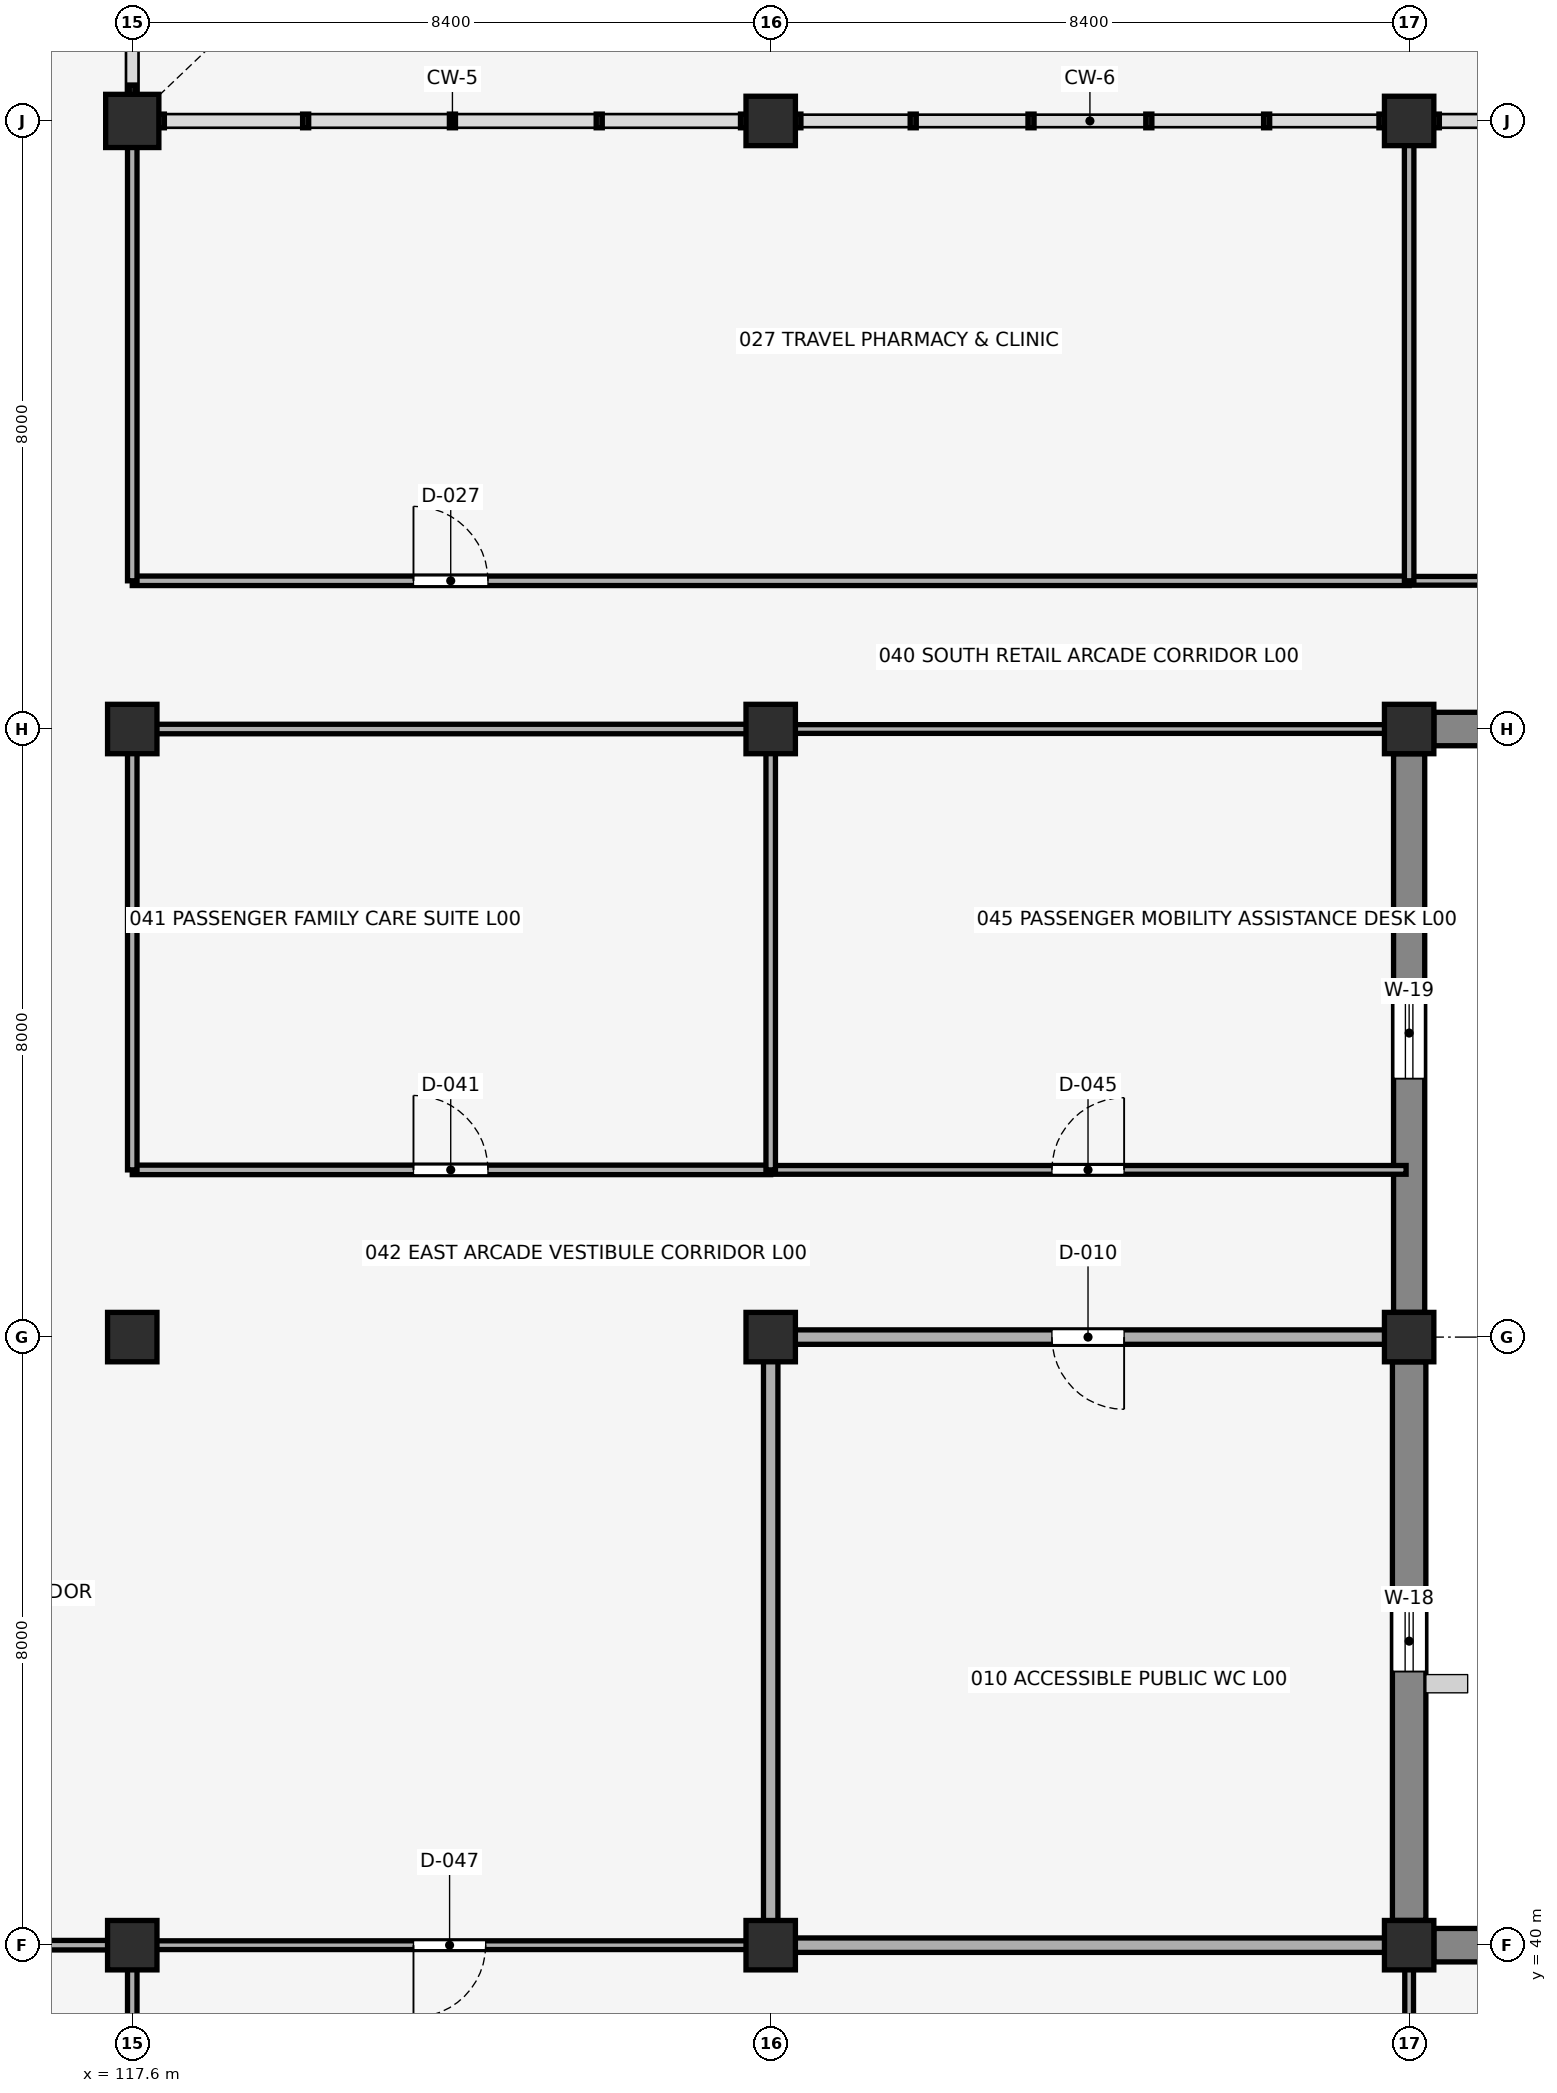
"""IFC4 building model, lengths in metres.
Left out: names, types, materials, properties, quantities, classifications, styles, units other than length and angle.
Written with IfcOpenShell. Run it as: python <this file> out.ifc"""

import sys

from ifc_helpers import new_model, si_unit, direction, frame, frame_2d, origin, origin_2d, place, context, subcontext, project, spatial, rectangle, circle, extrude, element, fill, save


model = new_model("IFC4")
c1 = context("Model", 3, precision=1e-05, world=origin(), true_north=direction((0.0, 1.0)))
c2 = subcontext(c1, "Body", "Model", "MODEL_VIEW")
j1 = project(units=[si_unit("LENGTHUNIT", "METRE"), si_unit("PLANEANGLEUNIT", "RADIAN")], contexts=[c1])
p1 = place(None, origin())
s1 = spatial("IfcSite", under=j1, at=p1, CompositionType="ELEMENT")
p2 = place(p1, origin())
s2 = spatial("IfcBuilding", under=s1, at=p2, CompositionType="ELEMENT")
p3 = place(p2, origin())
s3 = spatial("IfcBuildingStorey", under=s2, at=p3, CompositionType="ELEMENT", Elevation=0.0)
for number, where, z_axis, x_axis in (
    (1, (117.6, 40.0, 0.0), (0.0, 0.0, 1.0), (1.0, 0.0, 0.0)),
    (2, (117.6, 48.0, 0.0), (0.0, 0.0, 1.0), (1.0, 0.0, 0.0)),
    (3, (117.6, 56.0, 0.0), (0.0, 0.0, 1.0), (1.0, 0.0, 0.0)),
):
    element("IfcColumn", number, at=place(p3, frame(where, z_axis=z_axis, x_axis=x_axis)), inside=s3, PredefinedType="COLUMN", context=c2, shape_type="SweptSolid", body=[
        extrude(circle(Radius=0.325, at=origin_2d()), origin(), (0.0, 0.0, 1.0), 5.15),
    ])
p4 = place(p3, frame((117.6, 64.0, 0.0), z_axis=(0.0, 0.0, 1.0), x_axis=(1.0, 0.0, 0.0)))
e4 = element("IfcColumn", 4, at=p4, inside=s3, PredefinedType="COLUMN", context=c2, shape_type="SweptSolid", body=[
    extrude(rectangle(XDim=0.7, YDim=0.7, at=origin_2d()), origin(), (0.0, 0.0, 1.0), 5.15),
])
for number, where, z_axis, x_axis in (
    (5, (126.0, 40.0, 0.0), (0.0, 0.0, 1.0), (1.0, 0.0, 0.0)),
    (6, (126.0, 48.0, 0.0), (0.0, 0.0, 1.0), (1.0, 0.0, 0.0)),
    (7, (126.0, 56.0, 0.0), (0.0, 0.0, 1.0), (1.0, 0.0, 0.0)),
    (8, (126.0, 64.0, 0.0), (0.0, 0.0, 1.0), (1.0, 0.0, 0.0)),
    (9, (134.4, 40.0, 0.0), (0.0, 0.0, 1.0), (1.0, 0.0, 0.0)),
    (10, (134.4, 48.0, 0.0), (0.0, 0.0, 1.0), (1.0, 0.0, 0.0)),
    (11, (134.4, 56.0, 0.0), (0.0, 0.0, 1.0), (1.0, 0.0, 0.0)),
    (12, (134.4, 64.0, 0.0), (0.0, 0.0, 1.0), (1.0, 0.0, 0.0)),
):
    element("IfcColumn", number, at=place(p3, frame(where, z_axis=z_axis, x_axis=x_axis)), inside=s3, PredefinedType="COLUMN", context=c2, shape_type="SweptSolid", body=[
        extrude(circle(Radius=0.325, at=origin_2d()), origin(), (0.0, 0.0, 1.0), 5.15),
    ])
p5 = place(p3, frame((134.725, 56.0, 0.0), z_axis=(0.0, 0.0, 1.0), x_axis=(1.0, 0.0, 0.0)))
e13 = element("IfcWall", 13, at=p5, inside=s3, PredefinedType="SOLIDWALL", context=c2, shape_type="SweptSolid", body=[
    extrude(rectangle(XDim=7.75, YDim=0.44, at=frame_2d((3.875, 0.0))), origin(), (0.0, 0.0, 1.0), 4.74),
])
p6 = place(p5, frame((2.825, 0.0, 1.55), z_axis=(0.0, 0.0, 1.0), x_axis=(1.0, 0.0, 0.0)))
e14 = element("IfcOpeningElement", 14, at=p6, cuts=e13, PredefinedType="OPENING", context=c2, shape_type="SweptSolid", body=[
    extrude(rectangle(XDim=2.1, YDim=0.8, at=frame_2d((1.05, 0.4))), frame((0.0, 0.23, 0.0), z_axis=(0.0, -1.0, 0.0), x_axis=(1.0, 0.0, 0.0)), (0.0, 0.0, 1.0), 0.46),
])
p7 = place(p3, frame((134.4, 40.325, 0.0), z_axis=(0.0, 0.0, 1.0), x_axis=(0.0, 1.0, 0.0)))
e15 = element("IfcWall", 15, at=p7, inside=s3, PredefinedType="SOLIDWALL", context=c2, shape_type="SweptSolid", body=[
    extrude(rectangle(XDim=7.35, YDim=0.44, at=frame_2d((3.675, 0.0))), origin(), (0.0, 0.0, 1.0), 4.747),
])
p8 = place(p7, frame((3.275, 0.0, 0.65), z_axis=(0.0, 0.0, 1.0), x_axis=(1.0, 0.0, 0.0)))
e16 = element("IfcOpeningElement", 16, at=p8, cuts=e15, PredefinedType="OPENING", context=c2, shape_type="SweptSolid", body=[
    extrude(rectangle(XDim=0.8, YDim=1.85, at=frame_2d((0.4, 0.925))), frame((0.0, 0.23, 0.0), z_axis=(0.0, -1.0, 0.0), x_axis=(1.0, 0.0, 0.0)), (0.0, 0.0, 1.0), 0.46),
])
p9 = place(p3, frame((134.4, 48.325, 0.0), z_axis=(0.0, 0.0, 1.0), x_axis=(0.0, 1.0, 0.0)))
e17 = element("IfcWall", 17, at=p9, inside=s3, PredefinedType="SOLIDWALL", context=c2, shape_type="SweptSolid", body=[
    extrude(rectangle(XDim=7.35, YDim=0.41, at=frame_2d((3.675, 0.0))), origin(), (0.0, 0.0, 1.0), 4.747),
])
p10 = place(p9, frame((3.075, 0.0, 1.55), z_axis=(0.0, 0.0, 1.0), x_axis=(1.0, 0.0, 0.0)))
e18 = element("IfcOpeningElement", 18, at=p10, cuts=e17, PredefinedType="OPENING", context=c2, shape_type="SweptSolid", body=[
    extrude(rectangle(XDim=1.2, YDim=0.95, at=frame_2d((0.6, 0.475))), frame((0.0, 0.215, 0.0), z_axis=(0.0, -1.0, 0.0), x_axis=(1.0, 0.0, 0.0)), (0.0, 0.0, 1.0), 0.43),
])
p11 = place(p3, frame((134.725, 40.0, 0.0), z_axis=(0.0, 0.0, 1.0), x_axis=(1.0, 0.0, 0.0)))
e19 = element("IfcWall", 19, at=p11, inside=s3, PredefinedType="SOLIDWALL", context=c2, shape_type="SweptSolid", body=[
    extrude(rectangle(XDim=7.75, YDim=0.44, at=frame_2d((3.875, 0.0))), origin(), (0.0, 0.0, 1.0), 4.74),
])
p12 = place(p11, frame((3.075, 0.0, 0.9), z_axis=(0.0, 0.0, 1.0), x_axis=(1.0, 0.0, 0.0)))
e20 = element("IfcOpeningElement", 20, at=p12, cuts=e19, PredefinedType="OPENING", context=c2, shape_type="SweptSolid", body=[
    extrude(rectangle(XDim=1.6, YDim=1.2, at=frame_2d((0.8, 0.6))), frame((0.0, 0.23, 0.0), z_axis=(0.0, -1.0, 0.0), x_axis=(1.0, 0.0, 0.0)), (0.0, 0.0, 1.0), 0.46),
])
p13 = place(p3, frame((126.315, 48.0, 0.0), z_axis=(0.0, 0.0, 1.0), x_axis=(1.0, 0.0, 0.0)))
e21 = element("IfcWall", 21, at=p13, inside=s3, PredefinedType="PLUMBINGWALL", context=c2, shape_type="SweptSolid", body=[
    extrude(rectangle(XDim=7.77, YDim=0.19, at=frame_2d((3.885, 0.0))), origin(), (0.0, 0.0, 1.0), 4.605),
])
p14 = place(p13, frame((4.335, 0.0, 0.0), z_axis=(0.0, 0.0, 1.0), x_axis=(-1.0, 0.0, 0.0)))
e22 = element("IfcOpeningElement", 22, at=p14, cuts=e21, PredefinedType="OPENING", context=c2, shape_type="SweptSolid", body=[
    extrude(rectangle(XDim=0.95, YDim=2.15, at=frame_2d((0.475, 1.075))), frame((0.0, 0.105, 0.0), z_axis=(0.0, -1.0, 0.0), x_axis=(1.0, 0.0, 0.0)), (0.0, 0.0, 1.0), 0.21),
])
p15 = place(p3, frame((117.6, 50.2, 0.0), z_axis=(0.0, 0.0, 1.0), x_axis=(1.0, 0.0, 0.0)))
e23 = element("IfcWall", 23, at=p15, inside=s3, PredefinedType="PARTITIONING", context=c2, shape_type="SweptSolid", body=[
    extrude(rectangle(XDim=8.4, YDim=0.125, at=frame_2d((4.2, 0.0))), origin(), (0.0, 0.0, 1.0), 5.15),
])
p16 = place(p15, frame((3.7, 0.0, 0.0), z_axis=(0.0, 0.0, 1.0), x_axis=(1.0, 0.0, 0.0)))
e24 = element("IfcOpeningElement", 24, at=p16, cuts=e23, PredefinedType="OPENING", context=c2, shape_type="SweptSolid", body=[
    extrude(rectangle(XDim=0.98, YDim=2.15, at=frame_2d((0.49, 1.075))), frame((0.0, 0.073, 0.0), z_axis=(0.0, -1.0, 0.0), x_axis=(1.0, 0.0, 0.0)), (0.0, 0.0, 1.0), 0.145),
])
p17 = place(p3, frame((126.0, 50.2, 0.0), z_axis=(0.0, 0.0, 1.0), x_axis=(1.0, 0.0, 0.0)))
e25 = element("IfcWall", 25, at=p17, inside=s3, PredefinedType="PARTITIONING", context=c2, shape_type="SweptSolid", body=[
    extrude(rectangle(XDim=8.36, YDim=0.115, at=frame_2d((4.18, 0.0))), origin(), (0.0, 0.0, 1.0), 5.15),
])
p18 = place(p17, frame((3.7, 0.0, 0.0), z_axis=(0.0, 0.0, 1.0), x_axis=(1.0, 0.0, 0.0)))
e26 = element("IfcOpeningElement", 26, at=p18, cuts=e25, PredefinedType="OPENING", context=c2, shape_type="SweptSolid", body=[
    extrude(rectangle(XDim=0.95, YDim=2.15, at=frame_2d((0.475, 1.075))), frame((0.0, 0.067, 0.0), z_axis=(0.0, -1.0, 0.0), x_axis=(1.0, 0.0, 0.0)), (0.0, 0.0, 1.0), 0.135),
])
p19 = place(p3, frame((117.915, 40.0, 0.0), z_axis=(0.0, 0.0, 1.0), x_axis=(1.0, 0.0, 0.0)))
e27 = element("IfcWall", 27, at=p19, inside=s3, PredefinedType="PARTITIONING", context=c2, shape_type="SweptSolid", body=[
    extrude(rectangle(XDim=7.77, YDim=0.115, at=frame_2d((3.885, 0.0))), origin(), (0.0, 0.0, 1.0), 4.605),
])
p20 = place(p19, frame((4.335, 0.0, 0.0), z_axis=(0.0, 0.0, 1.0), x_axis=(-1.0, 0.0, 0.0)))
e28 = element("IfcOpeningElement", 28, at=p20, cuts=e27, PredefinedType="OPENING", context=c2, shape_type="SweptSolid", body=[
    extrude(rectangle(XDim=0.95, YDim=2.15, at=frame_2d((0.475, 1.075))), frame((0.0, 0.067, 0.0), z_axis=(0.0, -1.0, 0.0), x_axis=(1.0, 0.0, 0.0)), (0.0, 0.0, 1.0), 0.135),
])
p21 = place(p3, frame((117.6, 57.95, 0.0), z_axis=(0.0, 0.0, 1.0), x_axis=(1.0, 0.0, 0.0)))
e29 = element("IfcWall", 29, at=p21, inside=s3, PredefinedType="PARTITIONING", context=c2, shape_type="SweptSolid", body=[
    extrude(rectangle(XDim=16.8, YDim=0.125, at=frame_2d((8.4, 0.0))), origin(), (0.0, 0.0, 1.0), 5.15),
])
p22 = place(p21, frame((3.7, 0.0, 0.0), z_axis=(0.0, 0.0, 1.0), x_axis=(1.0, 0.0, 0.0)))
e30 = element("IfcOpeningElement", 30, at=p22, cuts=e29, PredefinedType="OPENING", context=c2, shape_type="SweptSolid", body=[
    extrude(rectangle(XDim=0.98, YDim=2.15, at=frame_2d((0.49, 1.075))), frame((0.0, 0.073, 0.0), z_axis=(0.0, -1.0, 0.0), x_axis=(1.0, 0.0, 0.0)), (0.0, 0.0, 1.0), 0.145),
])
p23 = place(p3, frame((134.4, 57.95, 0.0), z_axis=(0.0, 0.0, 1.0), x_axis=(1.0, 0.0, 0.0)))
e31 = element("IfcWall", 31, at=p23, inside=s3, PredefinedType="PARTITIONING", context=c2, shape_type="SweptSolid", body=[
    extrude(rectangle(XDim=16.8, YDim=0.115, at=frame_2d((8.4, 0.0))), origin(), (0.0, 0.0, 1.0), 4.542),
])
p24 = place(p23, frame((3.7, 0.0, 0.0), z_axis=(0.0, 0.0, 1.0), x_axis=(1.0, 0.0, 0.0)))
e32 = element("IfcOpeningElement", 32, at=p24, cuts=e31, PredefinedType="OPENING", context=c2, shape_type="SweptSolid", body=[
    extrude(rectangle(XDim=0.95, YDim=2.15, at=frame_2d((0.475, 1.075))), frame((0.0, 0.067, 0.0), z_axis=(0.0, -1.0, 0.0), x_axis=(1.0, 0.0, 0.0)), (0.0, 0.0, 1.0), 0.135),
])
p25 = place(p3, frame((126.315, 40.0, 0.0), z_axis=(0.0, 0.0, 1.0), x_axis=(1.0, 0.0, 0.0)))
e33 = element("IfcWall", 33, at=p25, inside=s3, PredefinedType="PLUMBINGWALL", context=c2, shape_type="SweptSolid", body=[
    extrude(rectangle(XDim=7.77, YDim=0.19, at=frame_2d((3.885, 0.0))), origin(), (0.0, 0.0, 1.0), 4.605),
])
p26 = place(p3, frame((126.0, 40.315, 0.0), z_axis=(0.0, 0.0, 1.0), x_axis=(0.0, 1.0, 0.0)))
e34 = element("IfcWall", 34, at=p26, inside=s3, PredefinedType="PLUMBINGWALL", context=c2, shape_type="SweptSolid", body=[
    extrude(rectangle(XDim=7.37, YDim=0.19, at=frame_2d((3.685, 0.0))), origin(), (0.0, 0.0, 1.0), 4.542),
])
p27 = place(p3, frame((117.915, 56.0, 0.0), z_axis=(0.0, 0.0, 1.0), x_axis=(1.0, 0.0, 0.0)))
e35 = element("IfcWall", 35, at=p27, inside=s3, PredefinedType="PARTITIONING", context=c2, shape_type="SweptSolid", body=[
    extrude(rectangle(XDim=7.77, YDim=0.125, at=frame_2d((3.885, 0.0))), origin(), (0.0, 0.0, 1.0), 4.605),
])
for number, where, z_axis, x_axis in (
    (36, (117.6, 50.2, 0.0), (0.0, 0.0, 1.0), (0.0, 1.0, 0.0)),
    (37, (126.0, 50.2, 0.0), (0.0, 0.0, 1.0), (0.0, 1.0, 0.0)),
):
    element("IfcWall", number, at=place(p3, frame(where, z_axis=z_axis, x_axis=x_axis)), inside=s3, PredefinedType="PARTITIONING", context=c2, shape_type="SweptSolid", body=[
        extrude(rectangle(XDim=5.485, YDim=0.125, at=frame_2d((2.743, 0.0))), origin(), (0.0, 0.0, 1.0), 4.542),
    ])
p28 = place(p3, frame((126.315, 56.0, 0.0), z_axis=(0.0, 0.0, 1.0), x_axis=(1.0, 0.0, 0.0)))
e38 = element("IfcWall", 38, at=p28, inside=s3, PredefinedType="PARTITIONING", context=c2, shape_type="SweptSolid", body=[
    extrude(rectangle(XDim=7.77, YDim=0.115, at=frame_2d((3.885, 0.0))), origin(), (0.0, 0.0, 1.0), 4.605),
])
p29 = place(p3, frame((109.515, 40.0, 0.0), z_axis=(0.0, 0.0, 1.0), x_axis=(1.0, 0.0, 0.0)))
e39 = element("IfcWall", 39, at=p29, inside=s3, PredefinedType="PARTITIONING", context=c2, shape_type="SweptSolid", body=[
    extrude(rectangle(XDim=7.77, YDim=0.125, at=frame_2d((3.885, 0.0))), origin(), (0.0, 0.0, 1.0), 4.605),
])
p30 = place(p3, frame((117.6, 32.187, 0.0), z_axis=(0.0, 0.0, 1.0), x_axis=(0.0, 1.0, 0.0)))
e40 = element("IfcWall", 40, at=p30, inside=s3, PredefinedType="PARTITIONING", context=c2, shape_type="SweptSolid", body=[
    extrude(rectangle(XDim=7.498, YDim=0.125, at=frame_2d((3.749, 0.0))), origin(), (0.0, 0.0, 1.0), 4.542),
])
p31 = place(p3, frame((134.4, 32.187, 0.0), z_axis=(0.0, 0.0, 1.0), x_axis=(0.0, 1.0, 0.0)))
e41 = element("IfcWall", 41, at=p31, inside=s3, PredefinedType="PARTITIONING", context=c2, shape_type="SweptSolid", body=[
    extrude(rectangle(XDim=7.498, YDim=0.115, at=frame_2d((3.749, 0.0))), origin(), (0.0, 0.0, 1.0), 4.542),
])
p32 = place(p3, frame((117.6, 57.95, 0.0), z_axis=(0.0, 0.0, 1.0), x_axis=(0.0, 1.0, 0.0)))
e42 = element("IfcWall", 42, at=p32, inside=s3, PredefinedType="PARTITIONING", context=c2, shape_type="SweptSolid", body=[
    extrude(rectangle(XDim=5.71, YDim=0.125, at=frame_2d((2.855, 0.0))), origin(), (0.0, 0.0, 1.0), 4.542),
])
p33 = place(p3, frame((134.4, 57.95, 0.0), z_axis=(0.0, 0.0, 1.0), x_axis=(0.0, 1.0, 0.0)))
e43 = element("IfcWall", 43, at=p33, inside=s3, PredefinedType="PARTITIONING", context=c2, shape_type="SweptSolid", body=[
    extrude(rectangle(XDim=5.735, YDim=0.125, at=frame_2d((2.868, 0.0))), origin(), (0.0, 0.0, 1.0), 4.542),
])
p34 = place(p8, origin())
e44 = element("IfcWindow", 44, at=p34, inside=s3, PartitioningType="SINGLE_PANEL", PredefinedType="WINDOW", context=c2, shape_type="SweptSolid", body=[
    extrude(rectangle(XDim=0.8, YDim=1.85, at=frame_2d((0.4, 0.925))), frame((0.0, 0.03, 0.0), z_axis=(0.0, -1.0, 0.0), x_axis=(1.0, 0.0, 0.0)), (0.0, 0.0, 1.0), 0.06),
])
fill(e16, e44)
p35 = place(p10, origin())
e45 = element("IfcWindow", 45, at=p35, inside=s3, PartitioningType="SINGLE_PANEL", PredefinedType="WINDOW", context=c2, shape_type="SweptSolid", body=[
    extrude(rectangle(XDim=1.2, YDim=0.95, at=frame_2d((0.6, 0.475))), frame((0.0, 0.03, 0.0), z_axis=(0.0, -1.0, 0.0), x_axis=(1.0, 0.0, 0.0)), (0.0, 0.0, 1.0), 0.06),
])
fill(e18, e45)
p36 = place(p14, origin())
e46 = element("IfcDoor", 46, at=p36, inside=s3, OperationType="SINGLE_SWING_LEFT", PredefinedType="DOOR", context=c2, shape_type="SweptSolid", body=[
    extrude(rectangle(XDim=0.95, YDim=2.15, at=frame_2d((0.475, 1.075))), frame((0.0, 0.025, 0.0), z_axis=(0.0, -1.0, 0.0), x_axis=(1.0, 0.0, 0.0)), (0.0, 0.0, 1.0), 0.05),
])
fill(e22, e46)
p37 = place(p16, origin())
e47 = element("IfcDoor", 47, at=p37, inside=s3, OperationType="SINGLE_SWING_LEFT", PredefinedType="DOOR", context=c2, shape_type="SweptSolid", body=[
    extrude(rectangle(XDim=0.98, YDim=2.15, at=frame_2d((0.49, 1.075))), frame((0.0, 0.025, 0.0), z_axis=(0.0, -1.0, 0.0), x_axis=(1.0, 0.0, 0.0)), (0.0, 0.0, 1.0), 0.05),
])
fill(e24, e47)
p38 = place(p18, origin())
e48 = element("IfcDoor", 48, at=p38, inside=s3, OperationType="SINGLE_SWING_RIGHT", PredefinedType="DOOR", context=c2, shape_type="SweptSolid", body=[
    extrude(rectangle(XDim=0.95, YDim=2.15, at=frame_2d((0.475, 1.075))), frame((0.0, 0.025, 0.0), z_axis=(0.0, -1.0, 0.0), x_axis=(1.0, 0.0, 0.0)), (0.0, 0.0, 1.0), 0.05),
])
fill(e26, e48)
p39 = place(p20, origin())
e49 = element("IfcDoor", 49, at=p39, inside=s3, OperationType="SINGLE_SWING_RIGHT", PredefinedType="DOOR", context=c2, shape_type="SweptSolid", body=[
    extrude(rectangle(XDim=0.95, YDim=2.15, at=frame_2d((0.475, 1.075))), frame((0.0, 0.025, 0.0), z_axis=(0.0, -1.0, 0.0), x_axis=(1.0, 0.0, 0.0)), (0.0, 0.0, 1.0), 0.05),
])
fill(e28, e49)
p40 = place(p22, origin())
e50 = element("IfcDoor", 50, at=p40, inside=s3, OperationType="SINGLE_SWING_LEFT", PredefinedType="DOOR", context=c2, shape_type="SweptSolid", body=[
    extrude(rectangle(XDim=0.98, YDim=2.15, at=frame_2d((0.49, 1.075))), frame((0.0, 0.025, 0.0), z_axis=(0.0, -1.0, 0.0), x_axis=(1.0, 0.0, 0.0)), (0.0, 0.0, 1.0), 0.05),
])
fill(e30, e50)
save(model, sys.argv[1])
